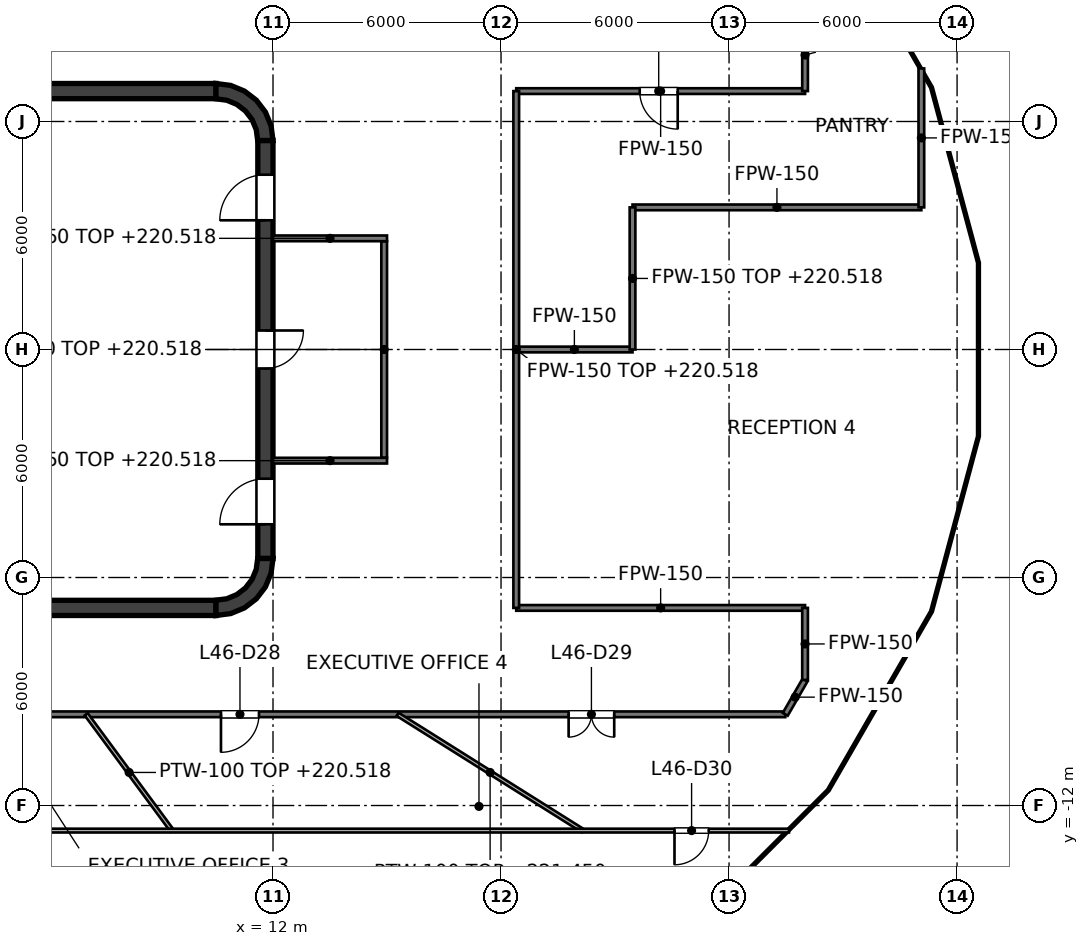
"""IFC4 building model, lengths in metres.
Left out: names, types, materials, properties, quantities, classifications, styles, units other than length and angle.
Written with IfcOpenShell. Run it as: python <this file> out.ifc"""

import sys

from ifc_helpers import new_model, si_unit, direction, frame, frame_2d, origin, place, context, subcontext, project, spatial, polyline, rectangle, outline, extrude, element, fill, save


model = new_model("IFC4")
c1 = context("Model", 3, precision=1e-05, world=origin(), true_north=direction((0.0, 1.0)))
c2 = subcontext(c1, "Body", "Model", "MODEL_VIEW")
j1 = project(units=[si_unit("LENGTHUNIT", "METRE"), si_unit("PLANEANGLEUNIT", "RADIAN")], contexts=[c1])
p1 = place(None, origin())
s1 = spatial("IfcSite", under=j1, at=p1, CompositionType="ELEMENT")
p2 = place(p1, origin())
s2 = spatial("IfcBuilding", under=s1, at=p2, CompositionType="ELEMENT")
p3 = place(p2, frame((0.0, 0.0, 217.6)))
s3 = spatial("IfcBuildingStorey", under=s2, at=p3, CompositionType="ELEMENT", Elevation=217.6)
for number, where, z_axis, x_axis in (
    (1, (-10.5, 6.8, 0.0), (0.0, 0.0, 1.0), (1.0, 0.0, 0.0)),
    (2, (-10.5, -6.8, 0.0), (0.0, 0.0, 1.0), (1.0, 0.0, 0.0)),
):
    element("IfcWall", number, at=place(p3, frame(where, z_axis=z_axis, x_axis=x_axis)), inside=s3, PredefinedType="SHEAR", context=c2, shape_type="SweptSolid", body=[
        extrude(rectangle(XDim=21.0, YDim=0.4, at=frame_2d((10.5, 0.0))), origin(), (0.0, 0.0, 1.0), 4.0),
    ])
p4 = place(p3, frame((11.8, -5.5, 0.0), z_axis=(0.0, 0.0, 1.0), x_axis=(0.0, 1.0, 0.0)))
e3 = element("IfcWall", 3, at=p4, inside=s3, PredefinedType="SHEAR", context=c2, shape_type="SweptSolid", body=[
    extrude(rectangle(XDim=11.0, YDim=0.4, at=frame_2d((5.5, 0.0))), origin(), (0.0, 0.0, 1.0), 4.0),
])
p5 = place(p4, frame((5.0, 0.0, 0.0)))
e4 = element("IfcOpeningElement", 4, at=p5, cuts=e3, PredefinedType="OPENING", context=c2, shape_type="SweptSolid", body=[
    extrude(rectangle(XDim=1.0, YDim=2.1, at=frame_2d((0.5, 1.05))), frame((0.0, 0.2, 0.0), z_axis=(0.0, -1.0, 0.0), x_axis=(1.0, 0.0, 0.0)), (0.0, 0.0, 1.0), 0.4),
])
p6 = place(p4, frame((0.9, 0.0, 0.0)))
e5 = element("IfcOpeningElement", 5, at=p6, cuts=e3, PredefinedType="OPENING", context=c2, shape_type="SweptSolid", body=[
    extrude(rectangle(XDim=1.2, YDim=2.1, at=frame_2d((0.6, 1.05))), frame((0.0, 0.2, 0.0), z_axis=(0.0, -1.0, 0.0), x_axis=(1.0, 0.0, 0.0)), (0.0, 0.0, 1.0), 0.4),
])
p7 = place(p4, frame((8.9, 0.0, 0.0)))
e6 = element("IfcOpeningElement", 6, at=p7, cuts=e3, PredefinedType="OPENING", context=c2, shape_type="SweptSolid", body=[
    extrude(rectangle(XDim=1.2, YDim=2.1, at=frame_2d((0.6, 1.05))), frame((0.0, 0.2, 0.0), z_axis=(0.0, -1.0, 0.0), x_axis=(1.0, 0.0, 0.0)), (0.0, 0.0, 1.0), 0.4),
])
p8 = place(p3, origin())
e7 = element("IfcWall", 7, at=p8, inside=s3, PredefinedType="SHEAR", context=c2, shape_type="SweptSolid", body=[
    extrude(outline(polyline([(10.5, 7.0), (10.5, 6.596), (10.784, 6.559), (11.048, 6.45), (11.275, 6.275), (11.45, 6.048), (11.559, 5.784), (11.596, 5.5), (12.0, 5.5), (11.949, 5.888), (11.799, 6.25), (11.561, 6.561), (11.25, 6.799), (10.888, 6.949), (10.5, 7.0)])), origin(), (0.0, 0.0, 1.0), 4.0),
])
e8 = element("IfcWall", 8, at=p8, inside=s3, PredefinedType="SHEAR", context=c2, shape_type="SweptSolid", body=[
    extrude(outline(polyline([(12.0, -5.5), (11.596, -5.5), (11.559, -5.784), (11.45, -6.048), (11.275, -6.275), (11.048, -6.45), (10.784, -6.559), (10.5, -6.596), (10.5, -7.0), (10.888, -6.949), (11.25, -6.799), (11.561, -6.561), (11.799, -6.25), (11.949, -5.888), (12.0, -5.5)])), origin(), (0.0, 0.0, 1.0), 4.0),
])
p9 = place(p3, frame((9.0, 4.1, 0.0), z_axis=(0.0, 0.0, 1.0), x_axis=(0.0, 1.0, 0.0)))
e9 = element("IfcWall", 9, at=p9, inside=s3, PredefinedType="SOLIDWALL", context=c2, shape_type="SweptSolid", body=[
    extrude(rectangle(XDim=2.5, YDim=0.25, at=frame_2d((1.25, 0.0))), origin(), (0.0, 0.0, 1.0), 3.85),
])
p10 = place(p9, frame((0.65, 0.0, 0.0)))
e10 = element("IfcOpeningElement", 10, at=p10, cuts=e9, PredefinedType="OPENING", context=c2, shape_type="SweptSolid", body=[
    extrude(rectangle(XDim=1.2, YDim=2.1, at=frame_2d((0.6, 1.05))), frame((0.0, 0.125, 0.0), z_axis=(0.0, -1.0, 0.0), x_axis=(1.0, 0.0, 0.0)), (0.0, 0.0, 1.0), 0.25),
])
p11 = place(p3, frame((9.0, -6.6, 0.0), z_axis=(0.0, 0.0, 1.0), x_axis=(0.0, 1.0, 0.0)))
e11 = element("IfcWall", 11, at=p11, inside=s3, PredefinedType="SOLIDWALL", context=c2, shape_type="SweptSolid", body=[
    extrude(rectangle(XDim=2.5, YDim=0.25, at=frame_2d((1.25, 0.0))), origin(), (0.0, 0.0, 1.0), 3.85),
])
p12 = place(p11, frame((0.65, 0.0, 0.0)))
e12 = element("IfcOpeningElement", 12, at=p12, cuts=e11, PredefinedType="OPENING", context=c2, shape_type="SweptSolid", body=[
    extrude(rectangle(XDim=1.2, YDim=2.1, at=frame_2d((0.6, 1.05))), frame((0.0, 0.125, 0.0), z_axis=(0.0, -1.0, 0.0), x_axis=(1.0, 0.0, 0.0)), (0.0, 0.0, 1.0), 0.25),
])
p13 = place(p3, frame((0.775, 1.525, 0.0), z_axis=(0.0, 0.0, 1.0), x_axis=(1.0, 0.0, 0.0)))
e13 = element("IfcWall", 13, at=p13, inside=s3, PredefinedType="SOLIDWALL", context=c2, shape_type="SweptSolid", body=[
    extrude(rectangle(XDim=8.35, YDim=0.25, at=frame_2d((4.175, 0.0))), origin(), (0.0, 0.0, 1.0), 3.85),
])
p14 = place(p13, frame((0.925, 0.0, 0.0)))
e14 = element("IfcOpeningElement", 14, at=p14, cuts=e13, PredefinedType="OPENING", context=c2, shape_type="SweptSolid", body=[
    extrude(rectangle(XDim=1.1, YDim=2.1, at=frame_2d((0.55, 1.05))), frame((0.0, 0.125, 0.0), z_axis=(0.0, -1.0, 0.0), x_axis=(1.0, 0.0, 0.0)), (0.0, 0.0, 1.0), 0.25),
])
p15 = place(p13, frame((3.625, 0.0, 0.0)))
e15 = element("IfcOpeningElement", 15, at=p15, cuts=e13, PredefinedType="OPENING", context=c2, shape_type="SweptSolid", body=[
    extrude(rectangle(XDim=1.1, YDim=2.1, at=frame_2d((0.55, 1.05))), frame((0.0, 0.125, 0.0), z_axis=(0.0, -1.0, 0.0), x_axis=(1.0, 0.0, 0.0)), (0.0, 0.0, 1.0), 0.25),
])
p16 = place(p13, frame((6.325, 0.0, 0.0)))
e16 = element("IfcOpeningElement", 16, at=p16, cuts=e13, PredefinedType="OPENING", context=c2, shape_type="SweptSolid", body=[
    extrude(rectangle(XDim=1.1, YDim=2.1, at=frame_2d((0.55, 1.05))), frame((0.0, 0.125, 0.0), z_axis=(0.0, -1.0, 0.0), x_axis=(1.0, 0.0, 0.0)), (0.0, 0.0, 1.0), 0.25),
])
p17 = place(p3, frame((0.775, 3.975, 0.0), z_axis=(0.0, 0.0, 1.0), x_axis=(1.0, 0.0, 0.0)))
e17 = element("IfcWall", 17, at=p17, inside=s3, PredefinedType="SOLIDWALL", context=c2, shape_type="SweptSolid", body=[
    extrude(rectangle(XDim=8.35, YDim=0.25, at=frame_2d((4.175, 0.0))), origin(), (0.0, 0.0, 1.0), 3.85),
])
for number, where, z_axis, x_axis in (
    (18, (9.0, 1.65, 0.0), (0.0, 0.0, 1.0), (0.0, 1.0, 0.0)),
    (19, (6.3, 1.65, 0.0), (0.0, 0.0, 1.0), (0.0, 1.0, 0.0)),
):
    element("IfcWall", number, at=place(p3, frame(where, z_axis=z_axis, x_axis=x_axis)), inside=s3, PredefinedType="SOLIDWALL", context=c2, shape_type="SweptSolid", body=[
        extrude(rectangle(XDim=2.2, YDim=0.25, at=frame_2d((1.1, 0.0))), origin(), (0.0, 0.0, 1.0), 3.85),
    ])
p18 = place(p3, frame((-9.125, -1.525, 0.0), z_axis=(0.0, 0.0, 1.0), x_axis=(1.0, 0.0, 0.0)))
e20 = element("IfcWall", 20, at=p18, inside=s3, PredefinedType="SOLIDWALL", context=c2, shape_type="SweptSolid", body=[
    extrude(rectangle(XDim=18.25, YDim=0.25, at=frame_2d((9.125, 0.0))), origin(), (0.0, 0.0, 1.0), 3.85),
])
p19 = place(p18, frame((7.15, 0.0, 0.0)))
e21 = element("IfcOpeningElement", 21, at=p19, cuts=e20, PredefinedType="OPENING", context=c2, shape_type="SweptSolid", body=[
    extrude(rectangle(XDim=1.2, YDim=2.1, at=frame_2d((0.6, 1.05))), frame((0.0, 0.125, 0.0), z_axis=(0.0, -1.0, 0.0), x_axis=(1.0, 0.0, 0.0)), (0.0, 0.0, 1.0), 0.25),
])
p20 = place(p18, frame((10.2, 0.0, 0.0)))
e22 = element("IfcOpeningElement", 22, at=p20, cuts=e20, PredefinedType="OPENING", context=c2, shape_type="SweptSolid", body=[
    extrude(rectangle(XDim=1.2, YDim=2.1, at=frame_2d((0.6, 1.05))), frame((0.0, 0.125, 0.0), z_axis=(0.0, -1.0, 0.0), x_axis=(1.0, 0.0, 0.0)), (0.0, 0.0, 1.0), 0.25),
])
p21 = place(p18, frame((16.075, 0.0, 0.0)))
e23 = element("IfcOpeningElement", 23, at=p21, cuts=e20, PredefinedType="OPENING", context=c2, shape_type="SweptSolid", body=[
    extrude(rectangle(XDim=1.0, YDim=2.1, at=frame_2d((0.5, 1.05))), frame((0.0, 0.125, 0.0), z_axis=(0.0, -1.0, 0.0), x_axis=(1.0, 0.0, 0.0)), (0.0, 0.0, 1.0), 0.25),
])
p22 = place(p3, frame((3.275, -3.975, 0.0), z_axis=(0.0, 0.0, 1.0), x_axis=(1.0, 0.0, 0.0)))
e24 = element("IfcWall", 24, at=p22, inside=s3, PredefinedType="SOLIDWALL", context=c2, shape_type="SweptSolid", body=[
    extrude(rectangle(XDim=5.85, YDim=0.25, at=frame_2d((2.925, 0.0))), origin(), (0.0, 0.0, 1.0), 3.85),
])
p23 = place(p3, frame((9.0, -3.85, 0.0), z_axis=(0.0, 0.0, 1.0), x_axis=(0.0, 1.0, 0.0)))
e25 = element("IfcWall", 25, at=p23, inside=s3, PredefinedType="SOLIDWALL", context=c2, shape_type="SweptSolid", body=[
    extrude(rectangle(XDim=2.2, YDim=0.25, at=frame_2d((1.1, 0.0))), origin(), (0.0, 0.0, 1.0), 3.85),
])
p24 = place(p3, frame((14.925, -2.85, 0.0), z_axis=(0.0, 0.0, 1.0), x_axis=(0.0, 1.0, 0.0)))
e26 = element("IfcWall", 26, at=p24, inside=s3, PredefinedType="PARTITIONING", context=c2, shape_type="SweptSolid", body=[
    extrude(rectangle(XDim=5.7, YDim=0.15, at=frame_2d((2.85, 0.0))), origin(), (0.0, 0.0, 1.0), 2.918),
])
for number, where, z_axis, x_axis in (
    (27, (12.0, 2.925, 0.0), (0.0, 0.0, 1.0), (1.0, 0.0, 0.0)),
    (28, (12.0, -2.925, 0.0), (0.0, 0.0, 1.0), (1.0, 0.0, 0.0)),
):
    element("IfcWall", number, at=place(p3, frame(where, z_axis=z_axis, x_axis=x_axis)), inside=s3, PredefinedType="PARTITIONING", context=c2, shape_type="SweptSolid", body=[
        extrude(rectangle(XDim=3.0, YDim=0.15, at=frame_2d((1.5, 0.0))), origin(), (0.0, 0.0, 1.0), 2.918),
    ])
p25 = place(p3, frame((-25.479, -9.6, 0.0), z_axis=(0.0, 0.0, 1.0), x_axis=(1.0, 0.0, 0.0)))
e29 = element("IfcWall", 29, at=p25, inside=s3, PredefinedType="PARTITIONING", context=c2, shape_type="SweptSolid", body=[
    extrude(rectangle(XDim=50.958, YDim=0.15, at=frame_2d((25.479, 0.0))), origin(), (0.0, 0.0, 1.0), 2.877),
])
p26 = place(p25, frame((5.129, 0.0, 0.0)))
e30 = element("IfcOpeningElement", 30, at=p26, cuts=e29, PredefinedType="OPENING", context=c2, shape_type="SweptSolid", body=[
    extrude(rectangle(XDim=1.0, YDim=2.1, at=frame_2d((0.5, 1.05))), frame((0.0, 0.075, 0.0), z_axis=(0.0, -1.0, 0.0), x_axis=(1.0, 0.0, 0.0)), (0.0, 0.0, 1.0), 0.15),
])
p27 = place(p25, frame((13.894, 0.0, 0.0)))
e31 = element("IfcOpeningElement", 31, at=p27, cuts=e29, PredefinedType="OPENING", context=c2, shape_type="SweptSolid", body=[
    extrude(rectangle(XDim=1.0, YDim=2.1, at=frame_2d((0.5, 1.05))), frame((0.0, 0.075, 0.0), z_axis=(0.0, -1.0, 0.0), x_axis=(1.0, 0.0, 0.0)), (0.0, 0.0, 1.0), 0.15),
])
p28 = place(p25, frame((23.443, 0.0, 0.0)))
e32 = element("IfcOpeningElement", 32, at=p28, cuts=e29, PredefinedType="OPENING", context=c2, shape_type="SweptSolid", body=[
    extrude(rectangle(XDim=1.0, YDim=2.1, at=frame_2d((0.5, 1.05))), frame((0.0, 0.075, 0.0), z_axis=(0.0, -1.0, 0.0), x_axis=(1.0, 0.0, 0.0)), (0.0, 0.0, 1.0), 0.15),
])
p29 = place(p25, frame((29.757, 0.0, 0.0)))
e33 = element("IfcOpeningElement", 33, at=p29, cuts=e29, PredefinedType="OPENING", context=c2, shape_type="SweptSolid", body=[
    extrude(rectangle(XDim=1.0, YDim=2.1, at=frame_2d((0.5, 1.05))), frame((0.0, 0.075, 0.0), z_axis=(0.0, -1.0, 0.0), x_axis=(1.0, 0.0, 0.0)), (0.0, 0.0, 1.0), 0.15),
])
p30 = place(p25, frame((36.11, 0.0, 0.0)))
e34 = element("IfcOpeningElement", 34, at=p30, cuts=e29, PredefinedType="OPENING", context=c2, shape_type="SweptSolid", body=[
    extrude(rectangle(XDim=1.0, YDim=2.1, at=frame_2d((0.5, 1.05))), frame((0.0, 0.075, 0.0), z_axis=(0.0, -1.0, 0.0), x_axis=(1.0, 0.0, 0.0)), (0.0, 0.0, 1.0), 0.15),
])
p31 = place(p25, frame((45.258, 0.0, 0.0)))
e35 = element("IfcOpeningElement", 35, at=p31, cuts=e29, PredefinedType="OPENING", context=c2, shape_type="SweptSolid", body=[
    extrude(rectangle(XDim=1.2, YDim=2.1, at=frame_2d((0.6, 1.05))), frame((0.0, 0.075, 0.0), z_axis=(0.0, -1.0, 0.0), x_axis=(1.0, 0.0, 0.0)), (0.0, 0.0, 1.0), 0.15),
])
p32 = place(p3, frame((18.4, -6.8, 0.0), z_axis=(0.0, 0.0, 1.0), x_axis=(1.0, 0.0, 0.0)))
e36 = element("IfcWall", 36, at=p32, inside=s3, PredefinedType="PARTITIONING", context=c2, shape_type="SweptSolid", body=[
    extrude(rectangle(XDim=7.6, YDim=0.15, at=frame_2d((3.8, 0.0))), origin(), (0.0, 0.0, 1.0), 2.927),
])
p33 = place(p3, frame((18.4, 0.0, 0.0), z_axis=(0.0, 0.0, 1.0), x_axis=(1.0, 0.0, 0.0)))
e37 = element("IfcWall", 37, at=p33, inside=s3, PredefinedType="PARTITIONING", context=c2, shape_type="SweptSolid", body=[
    extrude(rectangle(XDim=3.06, YDim=0.15, at=frame_2d((1.53, 0.0))), origin(), (0.0, 0.0, 1.0), 2.927),
])
p34 = place(p3, frame((21.46, 3.74, 0.0), z_axis=(0.0, 0.0, 1.0), x_axis=(1.0, 0.0, 0.0)))
e38 = element("IfcWall", 38, at=p34, inside=s3, PredefinedType="PARTITIONING", context=c2, shape_type="SweptSolid", body=[
    extrude(rectangle(XDim=7.6, YDim=0.15, at=frame_2d((3.8, 0.0))), origin(), (0.0, 0.0, 1.0), 2.927),
])
p35 = place(p3, frame((18.4, 6.8, 0.0), z_axis=(0.0, 0.0, 1.0), x_axis=(1.0, 0.0, 0.0)))
e39 = element("IfcWall", 39, at=p35, inside=s3, PredefinedType="PARTITIONING", context=c2, shape_type="SweptSolid", body=[
    extrude(rectangle(XDim=7.6, YDim=0.15, at=frame_2d((3.8, 0.0))), origin(), (0.0, 0.0, 1.0), 2.927),
])
p36 = place(p35, frame((3.249, 0.0, 0.0)))
e40 = element("IfcOpeningElement", 40, at=p36, cuts=e39, PredefinedType="OPENING", context=c2, shape_type="SweptSolid", body=[
    extrude(rectangle(XDim=1.0, YDim=2.1, at=frame_2d((0.5, 1.05))), frame((0.0, 0.075, 0.0), z_axis=(0.0, -1.0, 0.0), x_axis=(1.0, 0.0, 0.0)), (0.0, 0.0, 1.0), 0.15),
])
p37 = place(p3, frame((25.479, -9.6, 0.0), z_axis=(0.0, 0.0, 1.0), x_axis=(0.499715696113, 0.8661894845, 0.0)))
e41 = element("IfcWall", 41, at=p37, inside=s3, PredefinedType="PARTITIONING", context=c2, shape_type="SweptSolid", body=[
    extrude(rectangle(XDim=1.042, YDim=0.15, at=frame_2d((0.521, 0.0))), origin(), (0.0, 0.0, 1.0), 2.927),
])
p38 = place(p3, frame((29.06, 3.74, 0.0), z_axis=(0.0, 0.0, 1.0), x_axis=(0.0, 1.0, 0.0)))
e42 = element("IfcWall", 42, at=p38, inside=s3, PredefinedType="PARTITIONING", context=c2, shape_type="SweptSolid", body=[
    extrude(rectangle(XDim=3.656, YDim=0.15, at=frame_2d((1.828, 0.0))), origin(), (0.0, 0.0, 1.0), 2.918),
])
for number, where, z_axis, x_axis in (
    (43, (26.0, -8.697, 0.0), (0.0, 0.0, 1.0), (0.0, 1.0, 0.0)),
    (44, (26.0, 6.8, 0.0), (0.0, 0.0, 1.0), (0.0, 1.0, 0.0)),
):
    element("IfcWall", number, at=place(p3, frame(where, z_axis=z_axis, x_axis=x_axis)), inside=s3, PredefinedType="PARTITIONING", context=c2, shape_type="SweptSolid", body=[
        extrude(rectangle(XDim=1.897, YDim=0.15, at=frame_2d((0.948, 0.0))), origin(), (0.0, 0.0, 1.0), 2.927),
    ])
p39 = place(p3, frame((21.46, 0.0, 0.0), z_axis=(0.0, 0.0, 1.0), x_axis=(0.0, 1.0, 0.0)))
e45 = element("IfcWall", 45, at=p39, inside=s3, PredefinedType="PARTITIONING", context=c2, shape_type="SweptSolid", body=[
    extrude(rectangle(XDim=3.74, YDim=0.15, at=frame_2d((1.87, 0.0))), origin(), (0.0, 0.0, 1.0), 2.918),
])
p40 = place(p3, frame((18.4, -6.8, 0.0), z_axis=(0.0, 0.0, 1.0), x_axis=(0.0, 1.0, 0.0)))
e46 = element("IfcWall", 46, at=p40, inside=s3, PredefinedType="PARTITIONING", context=c2, shape_type="SweptSolid", body=[
    extrude(rectangle(XDim=13.6, YDim=0.15, at=frame_2d((6.8, 0.0))), origin(), (0.0, 0.0, 1.0), 2.918),
])
p41 = place(p3, frame((7.085, -9.6, 0.0), z_axis=(0.0, 0.0, 1.0), x_axis=(0.593787976906, -0.80462154985, 0.0)))
e47 = element("IfcWall", 47, at=p41, inside=s3, PredefinedType="PARTITIONING", context=c2, shape_type="SweptSolid", body=[
    extrude(rectangle(XDim=3.803, YDim=0.1, at=frame_2d((1.901, 0.0))), origin(), (0.0, 0.0, 1.0), 2.918),
])
p42 = place(p3, frame((15.278, -9.6, 0.0), z_axis=(0.0, 0.0, 1.0), x_axis=(0.84673434941, -0.532015922252, 0.0)))
e48 = element("IfcWall", 48, at=p42, inside=s3, PredefinedType="PARTITIONING", context=c2, shape_type="SweptSolid", body=[
    extrude(rectangle(XDim=5.751, YDim=0.1, at=frame_2d((2.876, 0.0))), origin(), (0.0, 0.0, 1.0), 3.85),
])
p43 = place(p3, frame((-21.928, -12.66, 0.0), z_axis=(0.0, 0.0, 1.0), x_axis=(1.0, 0.0, 0.0)))
e49 = element("IfcWall", 49, at=p43, inside=s3, PredefinedType="PARTITIONING", context=c2, shape_type="SweptSolid", body=[
    extrude(rectangle(XDim=47.506, YDim=0.1, at=frame_2d((23.753, 0.0))), origin(), (0.0, 0.0, 1.0), 2.877),
])
p44 = place(p43, frame((19.02, 0.0, 0.0)))
e50 = element("IfcOpeningElement", 50, at=p44, cuts=e49, PredefinedType="OPENING", context=c2, shape_type="SweptSolid", body=[
    extrude(rectangle(XDim=1.8, YDim=2.1, at=frame_2d((0.9, 1.05))), frame((0.0, 0.05, 0.0), z_axis=(0.0, -1.0, 0.0), x_axis=(1.0, 0.0, 0.0)), (0.0, 0.0, 1.0), 0.1),
])
p45 = place(p43, frame((44.492, 0.0, 0.0)))
e51 = element("IfcOpeningElement", 51, at=p45, cuts=e49, PredefinedType="OPENING", context=c2, shape_type="SweptSolid", body=[
    extrude(rectangle(XDim=0.9, YDim=2.1, at=frame_2d((0.45, 1.05))), frame((0.0, 0.05, 0.0), z_axis=(0.0, -1.0, 0.0), x_axis=(1.0, 0.0, 0.0)), (0.0, 0.0, 1.0), 0.1),
])
p46 = place(p16, origin())
e52 = element("IfcDoor", 52, at=p46, inside=s3, OperationType="DOUBLE_DOOR_SLIDING", PredefinedType="DOOR", context=c2, shape_type="SweptSolid", body=[
    extrude(rectangle(XDim=1.1, YDim=2.1, at=frame_2d((0.55, 1.05))), frame((0.0, 0.025, 0.0), z_axis=(0.0, -1.0, 0.0), x_axis=(1.0, 0.0, 0.0)), (0.0, 0.0, 1.0), 0.05),
])
fill(e16, e52)
p47 = place(p10, origin())
e53 = element("IfcDoor", 53, at=p47, inside=s3, OperationType="SINGLE_SWING_LEFT", PredefinedType="DOOR", context=c2, shape_type="SweptSolid", body=[
    extrude(rectangle(XDim=1.2, YDim=2.1, at=frame_2d((0.6, 1.05))), frame((0.0, 0.025, 0.0), z_axis=(0.0, -1.0, 0.0), x_axis=(1.0, 0.0, 0.0)), (0.0, 0.0, 1.0), 0.05),
])
fill(e10, e53)
p48 = place(p12, origin())
e54 = element("IfcDoor", 54, at=p48, inside=s3, OperationType="SINGLE_SWING_LEFT", PredefinedType="DOOR", context=c2, shape_type="SweptSolid", body=[
    extrude(rectangle(XDim=1.2, YDim=2.1, at=frame_2d((0.6, 1.05))), frame((0.0, 0.025, 0.0), z_axis=(0.0, -1.0, 0.0), x_axis=(1.0, 0.0, 0.0)), (0.0, 0.0, 1.0), 0.05),
])
fill(e12, e54)
p49 = place(p21, origin())
e55 = element("IfcDoor", 55, at=p49, inside=s3, OperationType="SINGLE_SWING_RIGHT", PredefinedType="DOOR", context=c2, shape_type="SweptSolid", body=[
    extrude(rectangle(XDim=1.0, YDim=2.1, at=frame_2d((0.5, 1.05))), frame((0.0, 0.025, 0.0), z_axis=(0.0, -1.0, 0.0), x_axis=(1.0, 0.0, 0.0)), (0.0, 0.0, 1.0), 0.05),
])
fill(e23, e55)
p50 = place(p5, origin())
e56 = element("IfcDoor", 56, at=p50, inside=s3, OperationType="SINGLE_SWING_RIGHT", PredefinedType="DOOR", context=c2, shape_type="SweptSolid", body=[
    extrude(rectangle(XDim=1.0, YDim=2.1, at=frame_2d((0.5, 1.05))), frame((0.0, 0.025, 0.0), z_axis=(0.0, -1.0, 0.0), x_axis=(1.0, 0.0, 0.0)), (0.0, 0.0, 1.0), 0.05),
])
fill(e4, e56)
p51 = place(p6, origin())
e57 = element("IfcDoor", 57, at=p51, inside=s3, OperationType="SINGLE_SWING_LEFT", PredefinedType="DOOR", context=c2, shape_type="SweptSolid", body=[
    extrude(rectangle(XDim=1.2, YDim=2.1, at=frame_2d((0.6, 1.05))), frame((0.0, 0.025, 0.0), z_axis=(0.0, -1.0, 0.0), x_axis=(1.0, 0.0, 0.0)), (0.0, 0.0, 1.0), 0.05),
])
fill(e5, e57)
p52 = place(p7, origin())
e58 = element("IfcDoor", 58, at=p52, inside=s3, OperationType="SINGLE_SWING_LEFT", PredefinedType="DOOR", context=c2, shape_type="SweptSolid", body=[
    extrude(rectangle(XDim=1.2, YDim=2.1, at=frame_2d((0.6, 1.05))), frame((0.0, 0.025, 0.0), z_axis=(0.0, -1.0, 0.0), x_axis=(1.0, 0.0, 0.0)), (0.0, 0.0, 1.0), 0.05),
])
fill(e6, e58)
p53 = place(p30, origin())
e59 = element("IfcDoor", 59, at=p53, inside=s3, OperationType="SINGLE_SWING_LEFT", PredefinedType="DOOR", context=c2, shape_type="SweptSolid", body=[
    extrude(rectangle(XDim=1.0, YDim=2.1, at=frame_2d((0.5, 1.05))), frame((0.0, 0.025, 0.0), z_axis=(0.0, -1.0, 0.0), x_axis=(1.0, 0.0, 0.0)), (0.0, 0.0, 1.0), 0.05),
])
fill(e34, e59)
p54 = place(p31, origin())
e60 = element("IfcDoor", 60, at=p54, inside=s3, OperationType="DOUBLE_DOOR_SINGLE_SWING", PredefinedType="DOOR", context=c2, shape_type="SweptSolid", body=[
    extrude(rectangle(XDim=1.2, YDim=2.1, at=frame_2d((0.6, 1.05))), frame((0.0, 0.025, 0.0), z_axis=(0.0, -1.0, 0.0), x_axis=(1.0, 0.0, 0.0)), (0.0, 0.0, 1.0), 0.05),
])
fill(e35, e60)
p55 = place(p45, origin())
e61 = element("IfcDoor", 61, at=p55, inside=s3, OperationType="SINGLE_SWING_LEFT", PredefinedType="DOOR", context=c2, shape_type="SweptSolid", body=[
    extrude(rectangle(XDim=0.9, YDim=2.1, at=frame_2d((0.45, 1.05))), frame((0.0, 0.025, 0.0), z_axis=(0.0, -1.0, 0.0), x_axis=(1.0, 0.0, 0.0)), (0.0, 0.0, 1.0), 0.05),
])
fill(e51, e61)
p56 = place(p36, origin())
e62 = element("IfcDoor", 62, at=p56, inside=s3, OperationType="SINGLE_SWING_RIGHT", PredefinedType="DOOR", context=c2, shape_type="SweptSolid", body=[
    extrude(rectangle(XDim=1.0, YDim=2.1, at=frame_2d((0.5, 1.05))), frame((0.0, 0.025, 0.0), z_axis=(0.0, -1.0, 0.0), x_axis=(1.0, 0.0, 0.0)), (0.0, 0.0, 1.0), 0.05),
])
fill(e40, e62)
save(model, sys.argv[1])
